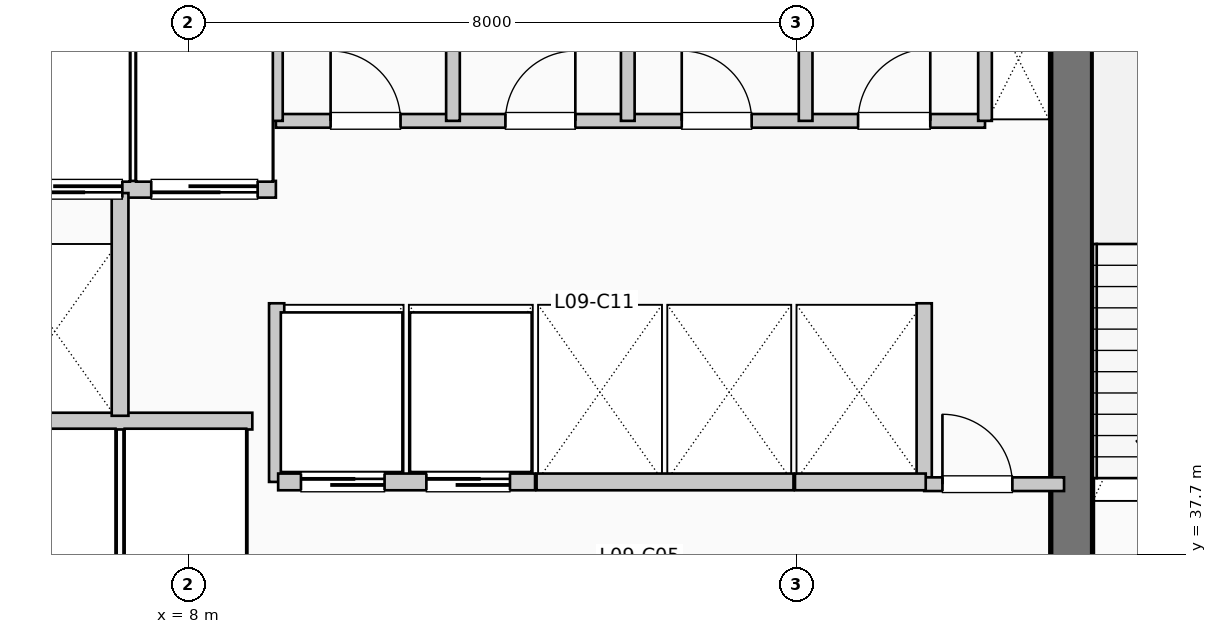
"""IFC4 building model, lengths in metres.
Left out: names, types, materials, properties, quantities, classifications, styles, units other than length and angle.
Written with IfcOpenShell. Run it as: python <this file> out.ifc"""

import sys

from ifc_helpers import new_model, si_unit, direction, frame, frame_2d, origin, place, context, subcontext, project, spatial, rectangle, extrude, element, fill, save


model = new_model("IFC4")
c1 = context("Model", 3, precision=1e-05, world=origin(), true_north=direction((0.0, 1.0)))
c2 = subcontext(c1, "Body", "Model", "MODEL_VIEW")
j1 = project(units=[si_unit("LENGTHUNIT", "METRE"), si_unit("PLANEANGLEUNIT", "RADIAN")], contexts=[c1])
p1 = place(None, origin())
s1 = spatial("IfcSite", under=j1, at=p1, CompositionType="ELEMENT")
p2 = place(p1, origin())
s2 = spatial("IfcBuilding", under=s1, at=p2, CompositionType="ELEMENT")
p3 = place(p2, frame((0.0, 0.0, 42.24)))
s3 = spatial("IfcBuildingStorey", under=s2, at=p3, CompositionType="ELEMENT", Elevation=42.24)
p4 = place(p3, frame((19.62, 37.15, 0.0), z_axis=(0.0, 0.0, 1.0), x_axis=(0.0, 1.0, 0.0)))
e1 = element("IfcWall", 1, at=p4, inside=s3, PredefinedType="SHEAR", context=c2, shape_type="SweptSolid", body=[
    extrude(rectangle(XDim=7.89, YDim=0.55, at=frame_2d((3.945, 0.0))), origin(), (0.0, 0.0, 1.0), 3.96),
])
p5 = place(p3, frame((5.38, 39.45, 0.0), z_axis=(0.0, 0.0, 1.0), x_axis=(1.0, 0.0, 0.0)))
e2 = element("IfcWall", 2, at=p5, inside=s3, PredefinedType="PARTITIONING", context=c2, shape_type="SweptSolid", body=[
    extrude(rectangle(XDim=3.46, YDim=0.22, at=frame_2d((1.73, 0.0))), origin(), (0.0, 0.0, 1.0), 3.71),
])
p6 = place(p3, frame((5.38, 42.5, 0.0), z_axis=(0.0, 0.0, 1.0), x_axis=(1.0, 0.0, 0.0)))
e3 = element("IfcWall", 3, at=p6, inside=s3, PredefinedType="PARTITIONING", context=c2, shape_type="SweptSolid", body=[
    extrude(rectangle(XDim=3.77, YDim=0.22, at=frame_2d((1.885, 0.0))), origin(), (0.0, 0.0, 1.0), 3.71),
])
p7 = place(p6, frame((1.75, 0.0, 0.0), z_axis=(0.0, 0.0, 1.0), x_axis=(-1.0, 0.0, 0.0)))
e4 = element("IfcOpeningElement", 4, at=p7, cuts=e3, PredefinedType="OPENING", context=c2, shape_type="SweptSolid", body=[
    extrude(rectangle(XDim=1.4, YDim=2.2, at=frame_2d((0.7, 1.1))), frame((0.0, 0.12, 0.0), z_axis=(0.0, -1.0, 0.0), x_axis=(1.0, 0.0, 0.0)), (0.0, 0.0, 1.0), 0.24),
])
p8 = place(p6, frame((3.53, 0.0, 0.0), z_axis=(0.0, 0.0, 1.0), x_axis=(-1.0, 0.0, 0.0)))
e5 = element("IfcOpeningElement", 5, at=p8, cuts=e3, PredefinedType="OPENING", context=c2, shape_type="SweptSolid", body=[
    extrude(rectangle(XDim=1.4, YDim=2.2, at=frame_2d((0.7, 1.1))), frame((0.0, 0.12, 0.0), z_axis=(0.0, -1.0, 0.0), x_axis=(1.0, 0.0, 0.0)), (0.0, 0.0, 1.0), 0.24),
])
p9 = place(p3, frame((7.1, 39.52, 0.0), z_axis=(0.0, 0.0, 1.0), x_axis=(0.0, 1.0, 0.0)))
e6 = element("IfcWall", 6, at=p9, inside=s3, PredefinedType="PARTITIONING", context=c2, shape_type="SweptSolid", body=[
    extrude(rectangle(XDim=2.93, YDim=0.22, at=frame_2d((1.465, 0.0))), origin(), (0.0, 0.0, 1.0), 3.71),
])
for number, where, z_axis, x_axis in (
    (7, (9.16, 38.65, 0.0), (0.0, 0.0, 1.0), (0.0, 1.0, 0.0)),
    (8, (17.68, 38.65, 0.0), (0.0, 0.0, 1.0), (0.0, 1.0, 0.0)),
):
    element("IfcWall", number, at=place(p3, frame(where, z_axis=z_axis, x_axis=x_axis)), inside=s3, PredefinedType="PARTITIONING", context=c2, shape_type="SweptSolid", body=[
        extrude(rectangle(XDim=2.35, YDim=0.2, at=frame_2d((1.175, 0.0))), origin(), (0.0, 0.0, 1.0), 3.71),
    ])
p10 = place(p3, frame((17.68, 38.62, 0.0), z_axis=(0.0, 0.0, 1.0), x_axis=(1.0, 0.0, 0.0)))
e9 = element("IfcWall", 9, at=p10, inside=s3, PredefinedType="PARTITIONING", context=c2, shape_type="SweptSolid", body=[
    extrude(rectangle(XDim=1.84, YDim=0.18, at=frame_2d((0.92, 0.0))), origin(), (0.0, 0.0, 1.0), 3.71),
])
p11 = place(p10, frame((0.24, 0.0, 0.0)))
e10 = element("IfcOpeningElement", 10, at=p11, cuts=e9, PredefinedType="OPENING", context=c2, shape_type="SweptSolid", body=[
    extrude(rectangle(XDim=0.92, YDim=2.1, at=frame_2d((0.46, 1.05))), frame((0.0, 0.1, 0.0), z_axis=(0.0, -1.0, 0.0), x_axis=(1.0, 0.0, 0.0)), (0.0, 0.0, 1.0), 0.2),
])
p12 = place(p3, frame((9.18, 38.65, 0.0), z_axis=(0.0, 0.0, 1.0), x_axis=(1.0, 0.0, 0.0)))
e11 = element("IfcWall", 11, at=p12, inside=s3, PredefinedType="PARTITIONING", context=c2, shape_type="SweptSolid", body=[
    extrude(rectangle(XDim=3.38, YDim=0.22, at=frame_2d((1.69, 0.0))), origin(), (0.0, 0.0, 1.0), 3.71),
])
p13 = place(p12, frame((0.3, 0.0, 0.0)))
e12 = element("IfcOpeningElement", 12, at=p13, cuts=e11, PredefinedType="OPENING", context=c2, shape_type="SweptSolid", body=[
    extrude(rectangle(XDim=1.1, YDim=2.2, at=frame_2d((0.55, 1.1))), frame((0.0, 0.12, 0.0), z_axis=(0.0, -1.0, 0.0), x_axis=(1.0, 0.0, 0.0)), (0.0, 0.0, 1.0), 0.24),
])
p14 = place(p12, frame((1.95, 0.0, 0.0)))
e13 = element("IfcOpeningElement", 13, at=p14, cuts=e11, PredefinedType="OPENING", context=c2, shape_type="SweptSolid", body=[
    extrude(rectangle(XDim=1.1, YDim=2.2, at=frame_2d((0.55, 1.1))), frame((0.0, 0.12, 0.0), z_axis=(0.0, -1.0, 0.0), x_axis=(1.0, 0.0, 0.0)), (0.0, 0.0, 1.0), 0.24),
])
p15 = place(p3, frame((12.58, 38.65, 0.0), z_axis=(0.0, 0.0, 1.0), x_axis=(1.0, 0.0, 0.0)))
e14 = element("IfcWall", 14, at=p15, inside=s3, PredefinedType="PARTITIONING", context=c2, shape_type="SweptSolid", body=[
    extrude(rectangle(XDim=3.38, YDim=0.22, at=frame_2d((1.69, 0.0))), origin(), (0.0, 0.0, 1.0), 3.71),
])
p16 = place(p3, frame((15.98, 38.65, 0.0), z_axis=(0.0, 0.0, 1.0), x_axis=(1.0, 0.0, 0.0)))
e15 = element("IfcWall", 15, at=p16, inside=s3, PredefinedType="PARTITIONING", context=c2, shape_type="SweptSolid", body=[
    extrude(rectangle(XDim=1.72, YDim=0.22, at=frame_2d((0.86, 0.0))), origin(), (0.0, 0.0, 1.0), 3.71),
])
p17 = place(p3, frame((9.15, 43.4, 0.0), z_axis=(0.0, 0.0, 1.0), x_axis=(1.0, 0.0, 0.0)))
e16 = element("IfcWall", 16, at=p17, inside=s3, PredefinedType="PLUMBINGWALL", context=c2, shape_type="SweptSolid", body=[
    extrude(rectangle(XDim=9.33, YDim=0.18, at=frame_2d((4.665, 0.0))), origin(), (0.0, 0.0, 1.0), 3.71),
])
p18 = place(p17, frame((0.72, 0.0, 0.0)))
e17 = element("IfcOpeningElement", 17, at=p18, cuts=e16, PredefinedType="OPENING", context=c2, shape_type="SweptSolid", body=[
    extrude(rectangle(XDim=0.92, YDim=2.1, at=frame_2d((0.46, 1.05))), frame((0.0, 0.1, 0.0), z_axis=(0.0, -1.0, 0.0), x_axis=(1.0, 0.0, 0.0)), (0.0, 0.0, 1.0), 0.2),
])
p19 = place(p17, frame((3.02, 0.0, 0.0)))
e18 = element("IfcOpeningElement", 18, at=p19, cuts=e16, PredefinedType="OPENING", context=c2, shape_type="SweptSolid", body=[
    extrude(rectangle(XDim=0.92, YDim=2.1, at=frame_2d((0.46, 1.05))), frame((0.0, 0.1, 0.0), z_axis=(0.0, -1.0, 0.0), x_axis=(1.0, 0.0, 0.0)), (0.0, 0.0, 1.0), 0.2),
])
p20 = place(p17, frame((5.34, 0.0, 0.0)))
e19 = element("IfcOpeningElement", 19, at=p20, cuts=e16, PredefinedType="OPENING", context=c2, shape_type="SweptSolid", body=[
    extrude(rectangle(XDim=0.92, YDim=2.1, at=frame_2d((0.46, 1.05))), frame((0.0, 0.1, 0.0), z_axis=(0.0, -1.0, 0.0), x_axis=(1.0, 0.0, 0.0)), (0.0, 0.0, 1.0), 0.2),
])
p21 = place(p17, frame((7.66, 0.0, 0.0)))
e20 = element("IfcOpeningElement", 20, at=p21, cuts=e16, PredefinedType="OPENING", context=c2, shape_type="SweptSolid", body=[
    extrude(rectangle(XDim=0.95, YDim=2.1, at=frame_2d((0.475, 1.05))), frame((0.0, 0.1, 0.0), z_axis=(0.0, -1.0, 0.0), x_axis=(1.0, 0.0, 0.0)), (0.0, 0.0, 1.0), 0.2),
])
for number, where, z_axis, x_axis in (
    (21, (9.15, 43.4, 0.0), (0.0, 0.0, 1.0), (0.0, 1.0, 0.0)),
    (22, (18.48, 43.4, 0.0), (0.0, 0.0, 1.0), (0.0, 1.0, 0.0)),
    (23, (11.48, 43.4, 0.0), (0.0, 0.0, 1.0), (0.0, 1.0, 0.0)),
    (24, (13.78, 43.4, 0.0), (0.0, 0.0, 1.0), (0.0, 1.0, 0.0)),
    (25, (16.12, 43.4, 0.0), (0.0, 0.0, 1.0), (0.0, 1.0, 0.0)),
):
    element("IfcWall", number, at=place(p3, frame(where, z_axis=z_axis, x_axis=x_axis)), inside=s3, PredefinedType="PLUMBINGWALL", context=c2, shape_type="SweptSolid", body=[
        extrude(rectangle(XDim=1.88, YDim=0.18, at=frame_2d((0.94, 0.0))), origin(), (0.0, 0.0, 1.0), 3.71),
    ])
p22 = place(p7, origin())
e26 = element("IfcDoor", 26, at=p22, inside=s3, OperationType="SLIDING_TO_LEFT", PredefinedType="DOOR", context=c2, shape_type="SweptSolid", body=[
    extrude(rectangle(XDim=1.4, YDim=2.2, at=frame_2d((0.7, 1.1))), frame((0.0, 0.025, 0.0), z_axis=(0.0, -1.0, 0.0), x_axis=(1.0, 0.0, 0.0)), (0.0, 0.0, 1.0), 0.05),
])
fill(e4, e26)
p23 = place(p8, origin())
e27 = element("IfcDoor", 27, at=p23, inside=s3, OperationType="SLIDING_TO_LEFT", PredefinedType="DOOR", context=c2, shape_type="SweptSolid", body=[
    extrude(rectangle(XDim=1.4, YDim=2.2, at=frame_2d((0.7, 1.1))), frame((0.0, 0.025, 0.0), z_axis=(0.0, -1.0, 0.0), x_axis=(1.0, 0.0, 0.0)), (0.0, 0.0, 1.0), 0.05),
])
fill(e5, e27)
p24 = place(p11, origin())
e28 = element("IfcDoor", 28, at=p24, inside=s3, OperationType="SINGLE_SWING_LEFT", PredefinedType="DOOR", context=c2, shape_type="SweptSolid", body=[
    extrude(rectangle(XDim=0.92, YDim=2.1, at=frame_2d((0.46, 1.05))), frame((0.0, 0.025, 0.0), z_axis=(0.0, -1.0, 0.0), x_axis=(1.0, 0.0, 0.0)), (0.0, 0.0, 1.0), 0.05),
])
fill(e10, e28)
p25 = place(p13, origin())
e29 = element("IfcDoor", 29, at=p25, inside=s3, OperationType="SLIDING_TO_LEFT", PredefinedType="DOOR", context=c2, shape_type="SweptSolid", body=[
    extrude(rectangle(XDim=1.1, YDim=2.2, at=frame_2d((0.55, 1.1))), frame((0.0, 0.025, 0.0), z_axis=(0.0, -1.0, 0.0), x_axis=(1.0, 0.0, 0.0)), (0.0, 0.0, 1.0), 0.05),
])
fill(e12, e29)
p26 = place(p14, origin())
e30 = element("IfcDoor", 30, at=p26, inside=s3, OperationType="SLIDING_TO_LEFT", PredefinedType="DOOR", context=c2, shape_type="SweptSolid", body=[
    extrude(rectangle(XDim=1.1, YDim=2.2, at=frame_2d((0.55, 1.1))), frame((0.0, 0.025, 0.0), z_axis=(0.0, -1.0, 0.0), x_axis=(1.0, 0.0, 0.0)), (0.0, 0.0, 1.0), 0.05),
])
fill(e13, e30)
p27 = place(p18, origin())
e31 = element("IfcDoor", 31, at=p27, inside=s3, OperationType="SINGLE_SWING_LEFT", PredefinedType="DOOR", context=c2, shape_type="SweptSolid", body=[
    extrude(rectangle(XDim=0.92, YDim=2.1, at=frame_2d((0.46, 1.05))), frame((0.0, 0.025, 0.0), z_axis=(0.0, -1.0, 0.0), x_axis=(1.0, 0.0, 0.0)), (0.0, 0.0, 1.0), 0.05),
])
fill(e17, e31)
p28 = place(p19, origin())
e32 = element("IfcDoor", 32, at=p28, inside=s3, OperationType="SINGLE_SWING_RIGHT", PredefinedType="DOOR", context=c2, shape_type="SweptSolid", body=[
    extrude(rectangle(XDim=0.92, YDim=2.1, at=frame_2d((0.46, 1.05))), frame((0.0, 0.025, 0.0), z_axis=(0.0, -1.0, 0.0), x_axis=(1.0, 0.0, 0.0)), (0.0, 0.0, 1.0), 0.05),
])
fill(e18, e32)
p29 = place(p20, origin())
e33 = element("IfcDoor", 33, at=p29, inside=s3, OperationType="SINGLE_SWING_LEFT", PredefinedType="DOOR", context=c2, shape_type="SweptSolid", body=[
    extrude(rectangle(XDim=0.92, YDim=2.1, at=frame_2d((0.46, 1.05))), frame((0.0, 0.025, 0.0), z_axis=(0.0, -1.0, 0.0), x_axis=(1.0, 0.0, 0.0)), (0.0, 0.0, 1.0), 0.05),
])
fill(e19, e33)
p30 = place(p21, origin())
e34 = element("IfcDoor", 34, at=p30, inside=s3, OperationType="SINGLE_SWING_RIGHT", PredefinedType="DOOR", context=c2, shape_type="SweptSolid", body=[
    extrude(rectangle(XDim=0.95, YDim=2.1, at=frame_2d((0.475, 1.05))), frame((0.0, 0.025, 0.0), z_axis=(0.0, -1.0, 0.0), x_axis=(1.0, 0.0, 0.0)), (0.0, 0.0, 1.0), 0.05),
])
fill(e20, e34)
save(model, sys.argv[1])
